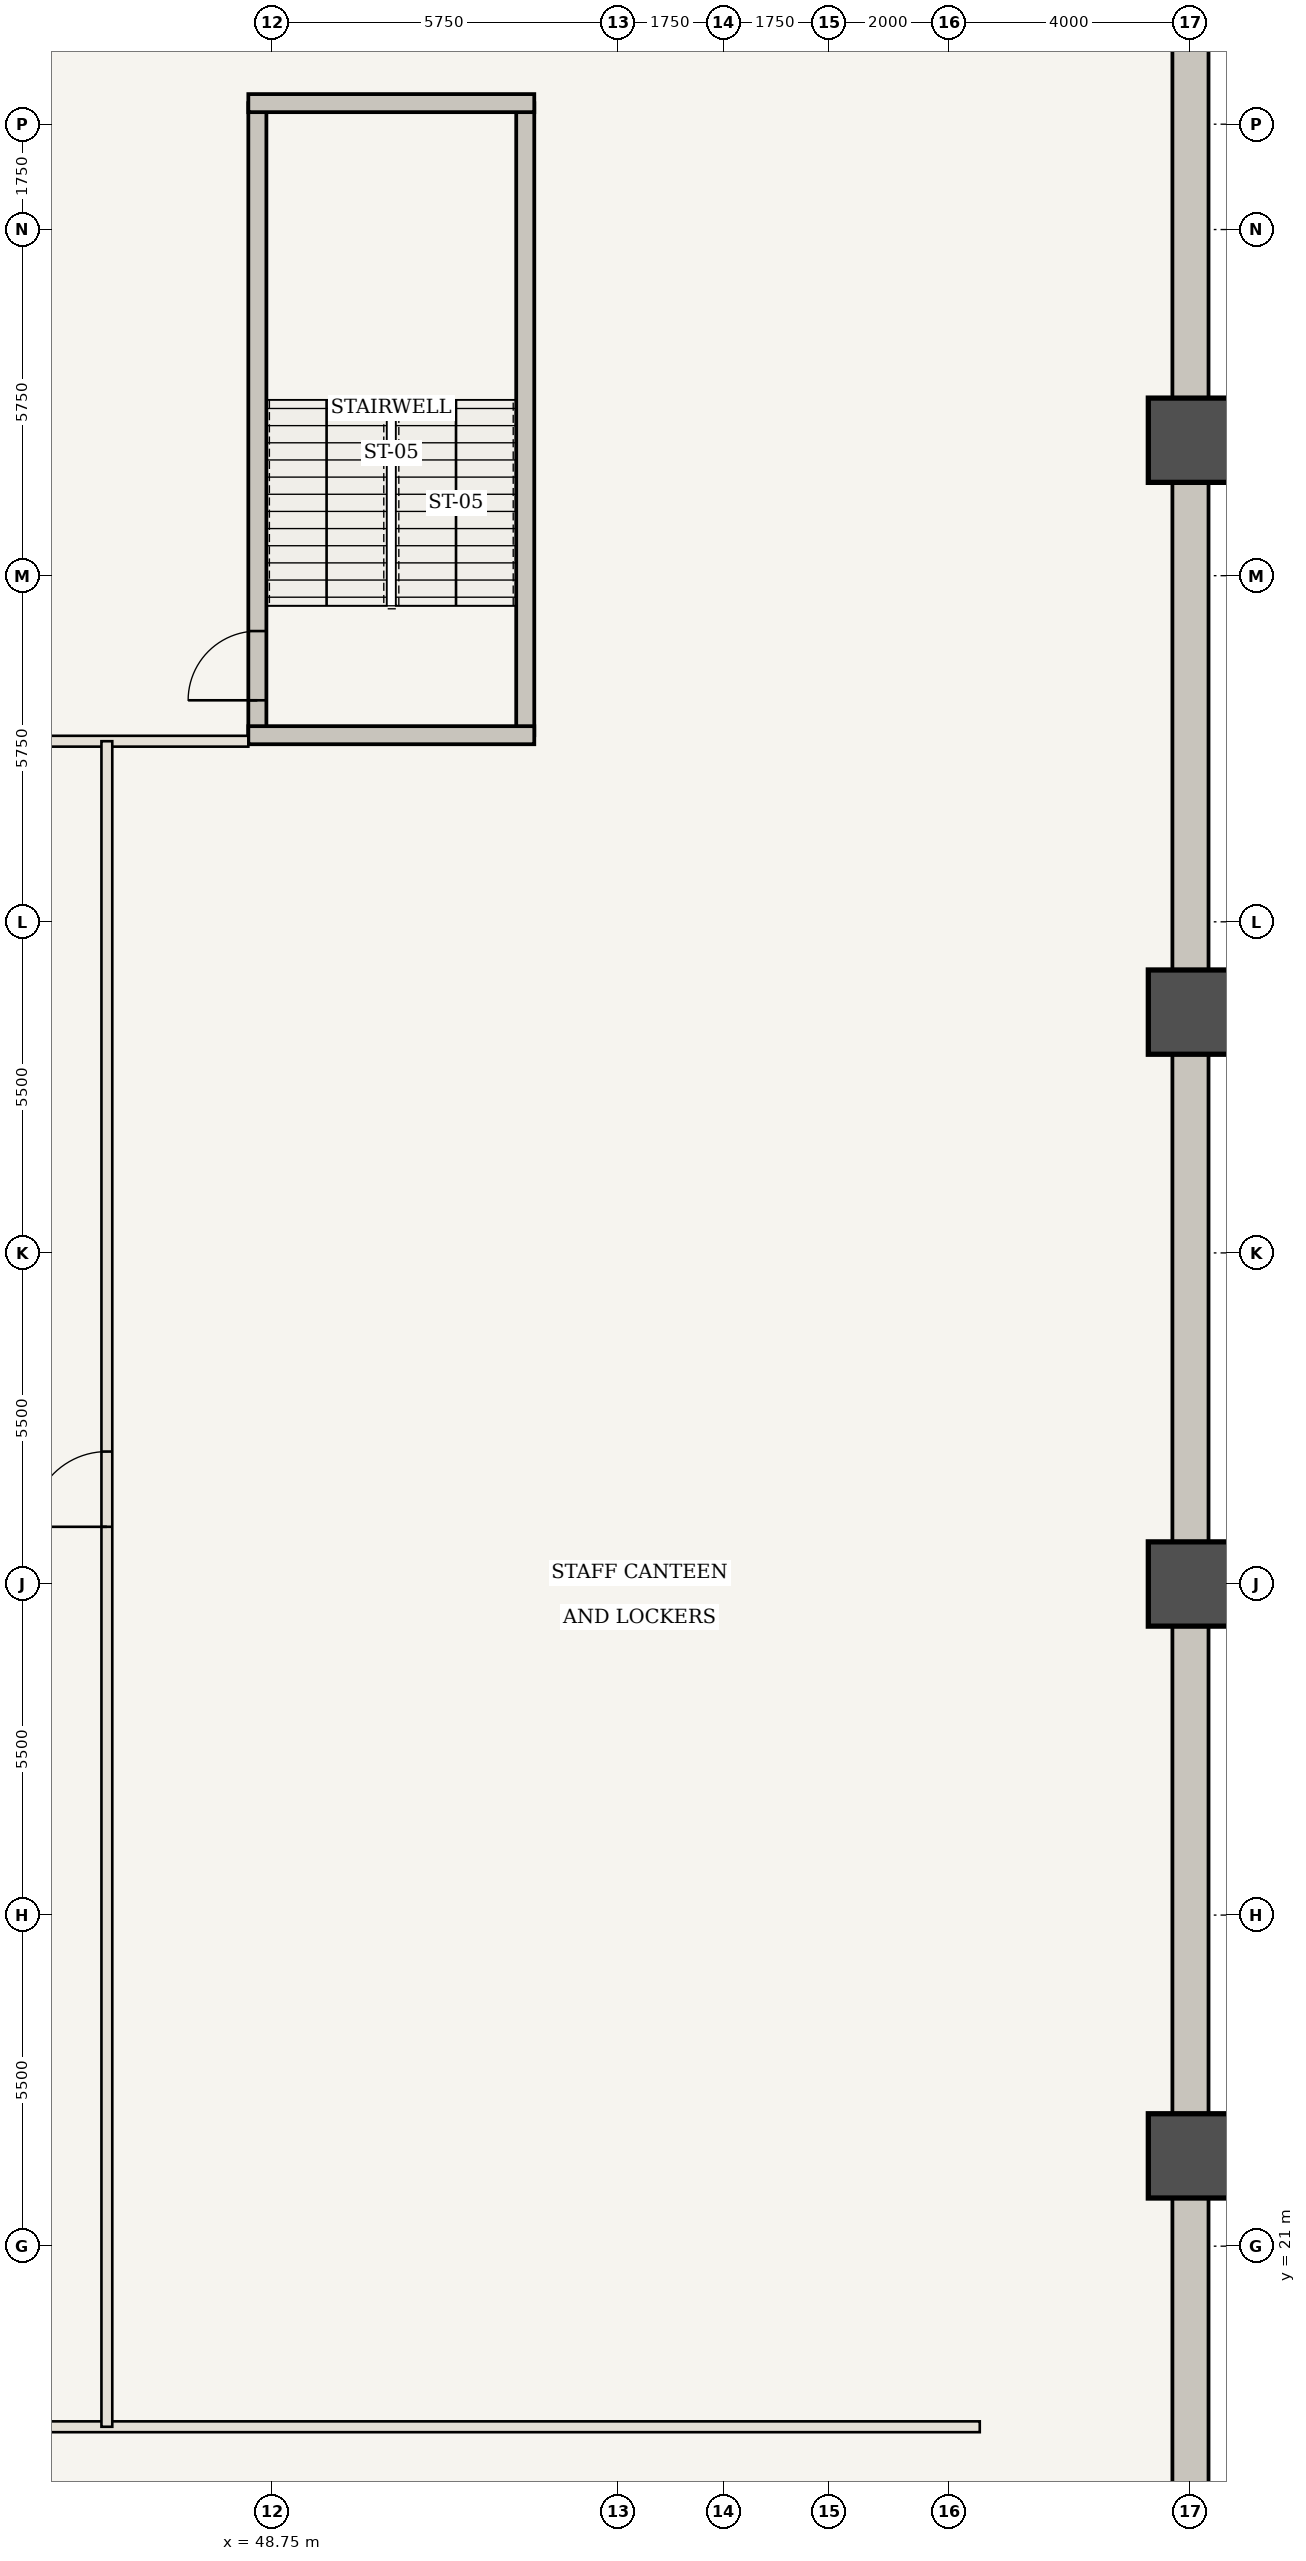
"""IFC4 building model, lengths in metres.
Left out: names, types, materials, properties, quantities, classifications, styles, units other than length and angle.
Written with IfcOpenShell. Run it as: python <this file> out.ifc"""

import sys

from ifc_helpers import new_model, si_unit, direction, frame, frame_2d, origin, origin_2d, place, context, subcontext, project, spatial, rectangle, extrude, element, fill, save


model = new_model("IFC4")
c1 = context("Model", 3, precision=1e-05, world=origin(), true_north=direction((0.0, 1.0)))
c2 = subcontext(c1, "Body", "Model", "MODEL_VIEW")
j1 = project(units=[si_unit("LENGTHUNIT", "METRE"), si_unit("PLANEANGLEUNIT", "RADIAN")], contexts=[c1])
p1 = place(None, origin())
s1 = spatial("IfcSite", under=j1, at=p1, CompositionType="ELEMENT")
p2 = place(p1, origin())
s2 = spatial("IfcBuilding", under=s1, at=p2, CompositionType="ELEMENT")
p3 = place(p2, frame((0.0, 0.0, -4.55)))
s3 = spatial("IfcBuildingStorey", under=s2, at=p3, CompositionType="ELEMENT", Elevation=-4.55)
p4 = place(p3, frame((64.0, 3.5, 0.0), z_axis=(0.0, 0.0, 1.0), x_axis=(0.0, 1.0, 0.0)))
e1 = element("IfcWall", 1, at=p4, inside=s3, PredefinedType="USERDEFINED", context=c2, shape_type="SweptSolid", body=[
    extrude(rectangle(XDim=57.0, YDim=0.6, at=frame_2d((28.5, 0.0))), origin(), (0.0, 0.0, 1.0), 4.55),
])
for number, where, z_axis, x_axis in (
    (2, (64.0, 22.5, 0.0), (0.0, 0.0, 1.0), (1.0, 0.0, 0.0)),
    (3, (64.0, 32.0, 0.0), (0.0, 0.0, 1.0), (1.0, 0.0, 0.0)),
    (4, (64.0, 41.5, 0.0), (0.0, 0.0, 1.0), (1.0, 0.0, 0.0)),
    (5, (64.0, 51.0, 0.0), (0.0, 0.0, 1.0), (1.0, 0.0, 0.0)),
):
    element("IfcColumn", number, at=place(p3, frame(where, z_axis=z_axis, x_axis=x_axis)), inside=s3, PredefinedType="COLUMN", context=c2, shape_type="SweptSolid", body=[
        extrude(rectangle(XDim=1.4, YDim=1.4, at=origin_2d()), origin(), (0.0, 0.0, 1.0), 4.55),
    ])
p5 = place(p3, frame((48.5, 46.1, 0.0), z_axis=(0.0, 0.0, 1.0), x_axis=(0.0, 1.0, 0.0)))
e6 = element("IfcWall", 6, at=p5, inside=s3, PredefinedType="SHEAR", context=c2, shape_type="SweptSolid", body=[
    extrude(rectangle(XDim=10.5, YDim=0.3, at=frame_2d((5.25, 0.0))), origin(), (0.0, 0.0, 1.0), 4.23),
])
p6 = place(p5, frame((0.58, 0.0, 0.0)))
e7 = element("IfcOpeningElement", 7, at=p6, cuts=e6, PredefinedType="OPENING", context=c2, shape_type="SweptSolid", body=[
    extrude(rectangle(XDim=1.15, YDim=2.15, at=frame_2d((0.575, 1.075))), frame((0.0, 0.16, 0.0), z_axis=(0.0, -1.0, 0.0), x_axis=(1.0, 0.0, 0.0)), (0.0, 0.0, 1.0), 0.32),
])
p7 = place(p3, frame((52.95, 46.1, 0.0), z_axis=(0.0, 0.0, 1.0), x_axis=(0.0, 1.0, 0.0)))
e8 = element("IfcWall", 8, at=p7, inside=s3, PredefinedType="SHEAR", context=c2, shape_type="SweptSolid", body=[
    extrude(rectangle(XDim=10.5, YDim=0.3, at=frame_2d((5.25, 0.0))), origin(), (0.0, 0.0, 1.0), 4.23),
])
for number, where, z_axis, x_axis in (
    (9, (48.35, 46.1, 0.0), (0.0, 0.0, 1.0), (1.0, 0.0, 0.0)),
    (10, (48.35, 56.6, 0.0), (0.0, 0.0, 1.0), (1.0, 0.0, 0.0)),
):
    element("IfcWall", number, at=place(p3, frame(where, z_axis=z_axis, x_axis=x_axis)), inside=s3, PredefinedType="SHEAR", context=c2, shape_type="SweptSolid", body=[
        extrude(rectangle(XDim=4.75, YDim=0.3, at=frame_2d((2.375, 0.0))), origin(), (0.0, 0.0, 1.0), 4.23),
    ])
p8 = place(p3, frame((38.0, 18.0, 0.0), z_axis=(0.0, 0.0, 1.0), x_axis=(1.0, 0.0, 0.0)))
e11 = element("IfcWall", 11, at=p8, inside=s3, PredefinedType="STANDARD", context=c2, shape_type="SweptSolid", body=[
    extrude(rectangle(XDim=22.5, YDim=0.18, at=frame_2d((11.25, 0.0))), origin(), (0.0, 0.0, 1.0), 4.23),
])
p9 = place(p8, frame((0.85, 0.0, 0.0)))
e12 = element("IfcOpeningElement", 12, at=p9, cuts=e11, PredefinedType="OPENING", context=c2, shape_type="SweptSolid", body=[
    extrude(rectangle(XDim=1.25, YDim=2.2, at=frame_2d((0.625, 1.1))), frame((0.0, 0.1, 0.0), z_axis=(0.0, -1.0, 0.0), x_axis=(1.0, 0.0, 0.0)), (0.0, 0.0, 1.0), 0.2),
])
p10 = place(p3, frame((26.0, 46.0, 0.0), z_axis=(0.0, 0.0, 1.0), x_axis=(1.0, 0.0, 0.0)))
e13 = element("IfcWall", 13, at=p10, inside=s3, PredefinedType="STANDARD", context=c2, shape_type="SweptSolid", body=[
    extrude(rectangle(XDim=22.35, YDim=0.18, at=frame_2d((11.175, 0.0))), origin(), (0.0, 0.0, 1.0), 4.23),
])
p11 = place(p10, frame((0.85, 0.0, 0.0)))
e14 = element("IfcOpeningElement", 14, at=p11, cuts=e13, PredefinedType="OPENING", context=c2, shape_type="SweptSolid", body=[
    extrude(rectangle(XDim=1.25, YDim=2.2, at=frame_2d((0.625, 1.1))), frame((0.0, 0.1, 0.0), z_axis=(0.0, -1.0, 0.0), x_axis=(1.0, 0.0, 0.0)), (0.0, 0.0, 1.0), 0.2),
])
p12 = place(p3, frame((46.0, 18.0, 0.0), z_axis=(0.0, 0.0, 1.0), x_axis=(0.0, 1.0, 0.0)))
e15 = element("IfcWall", 15, at=p12, inside=s3, PredefinedType="STANDARD", context=c2, shape_type="SweptSolid", body=[
    extrude(rectangle(XDim=28.0, YDim=0.18, at=frame_2d((14.0, 0.0))), origin(), (0.0, 0.0, 1.0), 4.23),
])
p13 = place(p12, frame((14.95, 0.0, 0.0)))
e16 = element("IfcOpeningElement", 16, at=p13, cuts=e15, PredefinedType="OPENING", context=c2, shape_type="SweptSolid", body=[
    extrude(rectangle(XDim=1.25, YDim=2.2, at=frame_2d((0.625, 1.1))), frame((0.0, 0.1, 0.0), z_axis=(0.0, -1.0, 0.0), x_axis=(1.0, 0.0, 0.0)), (0.0, 0.0, 1.0), 0.2),
])
p14 = place(p6, origin())
e17 = element("IfcDoor", 17, at=p14, inside=s3, OperationType="SINGLE_SWING_LEFT", PredefinedType="DOOR", context=c2, shape_type="SweptSolid", body=[
    extrude(rectangle(XDim=1.15, YDim=2.15, at=frame_2d((0.575, 1.075))), frame((0.0, 0.025, 0.0), z_axis=(0.0, -1.0, 0.0), x_axis=(1.0, 0.0, 0.0)), (0.0, 0.0, 1.0), 0.05),
])
fill(e7, e17)
p15 = place(p13, origin())
e18 = element("IfcDoor", 18, at=p15, inside=s3, OperationType="SINGLE_SWING_LEFT", PredefinedType="DOOR", context=c2, shape_type="SweptSolid", body=[
    extrude(rectangle(XDim=1.25, YDim=2.2, at=frame_2d((0.625, 1.1))), frame((0.0, 0.025, 0.0), z_axis=(0.0, -1.0, 0.0), x_axis=(1.0, 0.0, 0.0)), (0.0, 0.0, 1.0), 0.05),
])
fill(e16, e18)
save(model, sys.argv[1])
